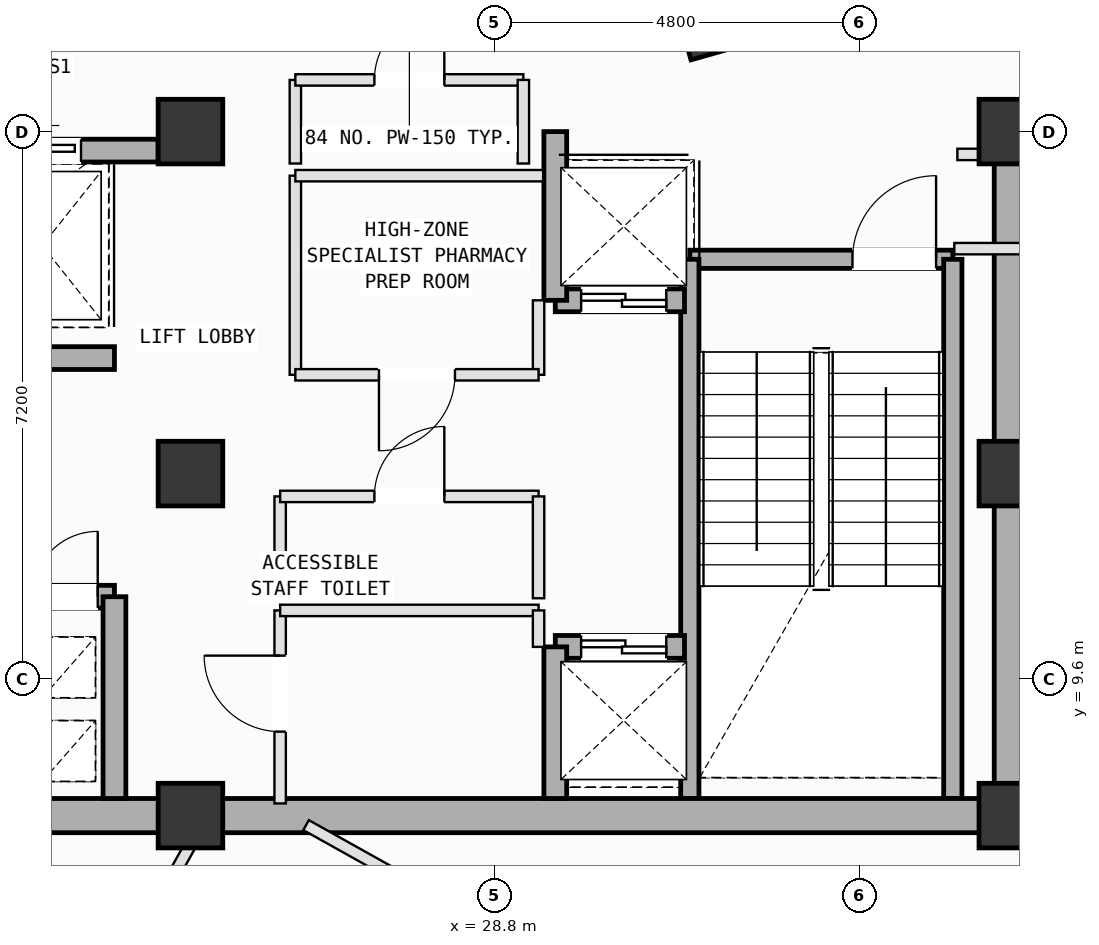
"""IFC4 building model, lengths in metres.
Left out: names, types, materials, properties, quantities, classifications, styles, units other than length and angle.
Written with IfcOpenShell. Run it as: python <this file> out.ifc"""

import sys

from ifc_helpers import new_model, si_unit, direction, frame, frame_2d, origin, origin_2d, place, context, subcontext, project, spatial, rectangle, extrude, element, fill, save


model = new_model("IFC4")
c1 = context("Model", 3, precision=1e-05, world=origin(), true_north=direction((0.0, 1.0)))
c2 = subcontext(c1, "Body", "Model", "MODEL_VIEW")
j1 = project(units=[si_unit("LENGTHUNIT", "METRE"), si_unit("PLANEANGLEUNIT", "RADIAN")], contexts=[c1])
p1 = place(None, origin())
s1 = spatial("IfcSite", under=j1, at=p1, CompositionType="ELEMENT")
p2 = place(p1, origin())
s2 = spatial("IfcBuilding", under=s1, at=p2, CompositionType="ELEMENT")
p3 = place(p2, frame((0.0, 0.0, 284.6)))
s3 = spatial("IfcBuildingStorey", under=s2, at=p3, CompositionType="ELEMENT", Elevation=284.6)
for number, where, z_axis, x_axis in (
    (1, (24.8, 7.8, 0.0), (0.0, 0.0, 1.0), (1.0, 0.0, 0.0)),
    (2, (24.8, 12.3, 0.0), (0.0, 0.0, 1.0), (1.0, 0.0, 0.0)),
    (3, (24.8, 16.8, 0.0), (0.0, 0.0, 1.0), (1.0, 0.0, 0.0)),
    (4, (35.6, 7.8, 0.0), (0.0, 0.0, 1.0), (1.0, 0.0, 0.0)),
    (5, (35.6, 12.3, 0.0), (0.0, 0.0, 1.0), (1.0, 0.0, 0.0)),
    (6, (35.6, 16.8, 0.0), (0.0, 0.0, 1.0), (1.0, 0.0, 0.0)),
):
    element("IfcColumn", number, at=place(p3, frame(where, z_axis=z_axis, x_axis=x_axis)), inside=s3, PredefinedType="COLUMN", context=c2, shape_type="SweptSolid", body=[
        extrude(rectangle(XDim=0.85, YDim=0.85, at=origin_2d()), origin(), (0.0, 0.0, 1.0), 4.0),
    ])
p4 = place(p3, frame((31.37, 15.12, 0.0), z_axis=(0.0, 0.0, 1.0), x_axis=(1.0, 0.0, 0.0)))
e7 = element("IfcWall", 7, at=p4, inside=s3, PredefinedType="SOLIDWALL", context=c2, shape_type="SweptSolid", body=[
    extrude(rectangle(XDim=3.46, YDim=0.24, at=frame_2d((1.73, 0.0))), origin(), (0.0, 0.0, 1.0), 3.78),
])
p5 = place(p4, frame((2.14, 0.0, 0.0)))
e8 = element("IfcOpeningElement", 8, at=p5, cuts=e7, PredefinedType="OPENING", context=c2, shape_type="SweptSolid", body=[
    extrude(rectangle(XDim=1.1, YDim=2.15, at=frame_2d((0.55, 1.075))), frame((0.0, 0.13, 0.0), z_axis=(0.0, -1.0, 0.0), x_axis=(1.0, 0.0, 0.0)), (0.0, 0.0, 1.0), 0.26),
])
for number, where, z_axis, x_axis in (
    (9, (34.83, 15.12, 0.0), (0.0, 0.0, 1.0), (0.0, -1.0, 0.0)),
    (10, (31.37, 8.025, 0.0), (0.0, 0.0, 1.0), (0.0, 1.0, 0.0)),
):
    element("IfcWall", number, at=place(p3, frame(where, z_axis=z_axis, x_axis=x_axis)), inside=s3, PredefinedType="SOLIDWALL", context=c2, shape_type="SweptSolid", body=[
        extrude(rectangle(XDim=7.095, YDim=0.24, at=frame_2d((3.548, 0.0))), origin(), (0.0, 0.0, 1.0), 3.78),
    ])
for number, where, z_axis, x_axis in (
    (11, (14.0, 7.8, 0.0), (0.0, 0.0, 1.0), (1.0, 0.0, 0.0)),
    (12, (24.8, 7.8, 0.0), (0.0, 0.0, 1.0), (1.0, 0.0, 0.0)),
):
    element("IfcWall", number, at=place(p3, frame(where, z_axis=z_axis, x_axis=x_axis)), inside=s3, PredefinedType="SHEAR", context=c2, shape_type="SweptSolid", body=[
        extrude(rectangle(XDim=10.8, YDim=0.45, at=frame_2d((5.4, 0.0))), origin(), (0.0, 0.0, 1.0), 3.78),
    ])
p6 = place(p3, frame((35.6, 7.8, 0.0), z_axis=(0.0, 0.0, 1.0), x_axis=(0.0, 1.0, 0.0)))
e13 = element("IfcWall", 13, at=p6, inside=s3, PredefinedType="SHEAR", context=c2, shape_type="SweptSolid", body=[
    extrude(rectangle(XDim=9.0, YDim=0.45, at=frame_2d((4.5, 0.0))), origin(), (0.0, 0.0, 1.0), 3.78),
])
p7 = place(p3, frame((19.85, 16.55, 0.0), z_axis=(0.0, 0.0, 1.0), x_axis=(1.0, 0.0, 0.0)))
e14 = element("IfcWall", 14, at=p7, inside=s3, PredefinedType="SOLIDWALL", context=c2, shape_type="SweptSolid", body=[
    extrude(rectangle(XDim=4.525, YDim=0.3, at=frame_2d((2.262, 0.0))), origin(), (0.0, 0.0, 1.0), 3.78),
])
p8 = place(p7, frame((0.475, 0.0, 0.0)))
e15 = element("IfcOpeningElement", 15, at=p8, cuts=e14, PredefinedType="OPENING", context=c2, shape_type="SweptSolid", body=[
    extrude(rectangle(XDim=1.25, YDim=2.18, at=frame_2d((0.625, 1.09))), frame((0.0, 0.16, 0.0), z_axis=(0.0, -1.0, 0.0), x_axis=(1.0, 0.0, 0.0)), (0.0, 0.0, 1.0), 0.32),
])
p9 = place(p7, frame((2.49, 0.0, 0.0)))
e16 = element("IfcOpeningElement", 16, at=p9, cuts=e14, PredefinedType="OPENING", context=c2, shape_type="SweptSolid", body=[
    extrude(rectangle(XDim=1.02, YDim=2.12, at=frame_2d((0.51, 1.06))), frame((0.0, 0.16, 0.0), z_axis=(0.0, -1.0, 0.0), x_axis=(1.0, 0.0, 0.0)), (0.0, 0.0, 1.0), 0.32),
])
p10 = place(p3, frame((18.5, 10.68, 0.0), z_axis=(0.0, 0.0, 1.0), x_axis=(1.0, 0.0, 0.0)))
e17 = element("IfcWall", 17, at=p10, inside=s3, PredefinedType="SOLIDWALL", context=c2, shape_type="SweptSolid", body=[
    extrude(rectangle(XDim=5.3, YDim=0.3, at=frame_2d((2.65, 0.0))), origin(), (0.0, 0.0, 1.0), 3.78),
])
p11 = place(p10, frame((4.22, 0.0, 0.0)))
e18 = element("IfcOpeningElement", 18, at=p11, cuts=e17, PredefinedType="OPENING", context=c2, shape_type="SweptSolid", body=[
    extrude(rectangle(XDim=0.86, YDim=2.06, at=frame_2d((0.43, 1.03))), frame((0.0, 0.16, 0.0), z_axis=(0.0, -1.0, 0.0), x_axis=(1.0, 0.0, 0.0)), (0.0, 0.0, 1.0), 0.32),
])
p12 = place(p10, frame((0.425, 0.0, 0.0)))
e19 = element("IfcOpeningElement", 19, at=p12, cuts=e17, PredefinedType="OPENING", context=c2, shape_type="SweptSolid", body=[
    extrude(rectangle(XDim=1.25, YDim=2.18, at=frame_2d((0.625, 1.09))), frame((0.0, 0.16, 0.0), z_axis=(0.0, -1.0, 0.0), x_axis=(1.0, 0.0, 0.0)), (0.0, 0.0, 1.0), 0.32),
])
p13 = place(p10, frame((2.525, 0.0, 0.0)))
e20 = element("IfcOpeningElement", 20, at=p13, cuts=e17, PredefinedType="OPENING", context=c2, shape_type="SweptSolid", body=[
    extrude(rectangle(XDim=1.25, YDim=2.18, at=frame_2d((0.625, 1.09))), frame((0.0, 0.16, 0.0), z_axis=(0.0, -1.0, 0.0), x_axis=(1.0, 0.0, 0.0)), (0.0, 0.0, 1.0), 0.32),
])
p14 = place(p3, frame((18.5, 13.82, 0.0), z_axis=(0.0, 0.0, 1.0), x_axis=(1.0, 0.0, 0.0)))
e21 = element("IfcWall", 21, at=p14, inside=s3, PredefinedType="SOLIDWALL", context=c2, shape_type="SweptSolid", body=[
    extrude(rectangle(XDim=5.3, YDim=0.3, at=frame_2d((2.65, 0.0))), origin(), (0.0, 0.0, 1.0), 3.78),
])
p15 = place(p14, frame((0.18, 0.0, 0.0)))
e22 = element("IfcOpeningElement", 22, at=p15, cuts=e21, PredefinedType="OPENING", context=c2, shape_type="SweptSolid", body=[
    extrude(rectangle(XDim=1.1, YDim=2.15, at=frame_2d((0.55, 1.075))), frame((0.0, 0.16, 0.0), z_axis=(0.0, -1.0, 0.0), x_axis=(1.0, 0.0, 0.0)), (0.0, 0.0, 1.0), 0.32),
])
p16 = place(p3, frame((23.8, 8.025, 0.0), z_axis=(0.0, 0.0, 1.0), x_axis=(0.0, 1.0, 0.0)))
e23 = element("IfcWall", 23, at=p16, inside=s3, PredefinedType="SOLIDWALL", context=c2, shape_type="SweptSolid", body=[
    extrude(rectangle(XDim=2.655, YDim=0.3, at=frame_2d((1.328, 0.0))), origin(), (0.0, 0.0, 1.0), 3.78),
])
p17 = place(p3, frame((29.6, 10.02, 0.0), z_axis=(0.0, 0.0, 1.0), x_axis=(1.0, 0.0, 0.0)))
e24 = element("IfcWall", 24, at=p17, inside=s3, PredefinedType="SOLIDWALL", context=c2, shape_type="SweptSolid", body=[
    extrude(rectangle(XDim=1.7, YDim=0.3, at=frame_2d((0.85, 0.0))), origin(), (0.0, 0.0, 1.0), 3.78),
])
p18 = place(p17, frame((0.34, 0.0, 0.0)))
e25 = element("IfcOpeningElement", 25, at=p18, cuts=e24, PredefinedType="OPENING", context=c2, shape_type="SweptSolid", body=[
    extrude(rectangle(XDim=1.12, YDim=2.15, at=frame_2d((0.56, 1.075))), frame((0.0, 0.16, 0.0), z_axis=(0.0, -1.0, 0.0), x_axis=(1.0, 0.0, 0.0)), (0.0, 0.0, 1.0), 0.32),
])
p19 = place(p3, frame((29.6, 8.025, 0.0), z_axis=(0.0, 0.0, 1.0), x_axis=(0.0, 1.0, 0.0)))
e26 = element("IfcWall", 26, at=p19, inside=s3, PredefinedType="SOLIDWALL", context=c2, shape_type="SweptSolid", body=[
    extrude(rectangle(XDim=1.995, YDim=0.3, at=frame_2d((0.998, 0.0))), origin(), (0.0, 0.0, 1.0), 3.78),
])
p20 = place(p3, frame((29.6, 14.58, 0.0), z_axis=(0.0, 0.0, 1.0), x_axis=(1.0, 0.0, 0.0)))
e27 = element("IfcWall", 27, at=p20, inside=s3, PredefinedType="SOLIDWALL", context=c2, shape_type="SweptSolid", body=[
    extrude(rectangle(XDim=1.7, YDim=0.3, at=frame_2d((0.85, 0.0))), origin(), (0.0, 0.0, 1.0), 3.78),
])
p21 = place(p20, frame((0.34, 0.0, 0.0)))
e28 = element("IfcOpeningElement", 28, at=p21, cuts=e27, PredefinedType="OPENING", context=c2, shape_type="SweptSolid", body=[
    extrude(rectangle(XDim=1.12, YDim=2.15, at=frame_2d((0.56, 1.075))), frame((0.0, 0.16, 0.0), z_axis=(0.0, -1.0, 0.0), x_axis=(1.0, 0.0, 0.0)), (0.0, 0.0, 1.0), 0.32),
])
p22 = place(p3, frame((29.6, 14.58, 0.0), z_axis=(0.0, 0.0, 1.0), x_axis=(0.0, 1.0, 0.0)))
e29 = element("IfcWall", 29, at=p22, inside=s3, PredefinedType="SOLIDWALL", context=c2, shape_type="SweptSolid", body=[
    extrude(rectangle(XDim=2.22, YDim=0.3, at=frame_2d((1.11, 0.0))), origin(), (0.0, 0.0, 1.0), 3.78),
])
p23 = place(p3, frame((25.98, 7.96, 0.0), z_axis=(0.0, 0.0, 1.0), x_axis=(0.0, 1.0, 0.0)))
e30 = element("IfcWall", 30, at=p23, inside=s3, PredefinedType="PARTITIONING", context=c2, shape_type="SweptSolid", body=[
    extrude(rectangle(XDim=2.54, YDim=0.15, at=frame_2d((1.27, 0.0))), origin(), (0.0, 0.0, 1.0), 3.78),
])
p24 = place(p23, frame((0.945, 0.0, 0.0)))
e31 = element("IfcOpeningElement", 31, at=p24, cuts=e30, PredefinedType="OPENING", context=c2, shape_type="SweptSolid", body=[
    extrude(rectangle(XDim=1.0, YDim=2.12, at=frame_2d((0.5, 1.06))), frame((0.0, 0.085, 0.0), z_axis=(0.0, -1.0, 0.0), x_axis=(1.0, 0.0, 0.0)), (0.0, 0.0, 1.0), 0.17),
])
p25 = place(p3, frame((25.98, 10.5, 0.0), z_axis=(0.0, 0.0, 1.0), x_axis=(1.0, 0.0, 0.0)))
e32 = element("IfcWall", 32, at=p25, inside=s3, PredefinedType="PARTITIONING", context=c2, shape_type="SweptSolid", body=[
    extrude(rectangle(XDim=3.4, YDim=0.15, at=frame_2d((1.7, 0.0))), origin(), (0.0, 0.0, 1.0), 3.78),
])
p26 = place(p3, frame((29.38, 10.5, 0.0), z_axis=(0.0, 0.0, 1.0), x_axis=(0.0, -1.0, 0.0)))
e33 = element("IfcWall", 33, at=p26, inside=s3, PredefinedType="PARTITIONING", context=c2, shape_type="SweptSolid", body=[
    extrude(rectangle(XDim=0.48, YDim=0.15, at=frame_2d((0.24, 0.0))), origin(), (0.0, 0.0, 1.0), 3.78),
])
p27 = place(p3, frame((25.98, 10.66, 0.0), z_axis=(0.0, 0.0, 1.0), x_axis=(0.0, 1.0, 0.0)))
e34 = element("IfcWall", 34, at=p27, inside=s3, PredefinedType="PARTITIONING", context=c2, shape_type="SweptSolid", body=[
    extrude(rectangle(XDim=1.34, YDim=0.15, at=frame_2d((0.67, 0.0))), origin(), (0.0, 0.0, 1.0), 3.78),
])
p28 = place(p3, frame((25.98, 12.0, 0.0), z_axis=(0.0, 0.0, 1.0), x_axis=(1.0, 0.0, 0.0)))
e35 = element("IfcWall", 35, at=p28, inside=s3, PredefinedType="PARTITIONING", context=c2, shape_type="SweptSolid", body=[
    extrude(rectangle(XDim=3.4, YDim=0.15, at=frame_2d((1.7, 0.0))), origin(), (0.0, 0.0, 1.0), 3.78),
])
p29 = place(p28, frame((1.24, 0.0, 0.0)))
e36 = element("IfcOpeningElement", 36, at=p29, cuts=e35, PredefinedType="OPENING", context=c2, shape_type="SweptSolid", body=[
    extrude(rectangle(XDim=0.92, YDim=2.1, at=frame_2d((0.46, 1.05))), frame((0.0, 0.085, 0.0), z_axis=(0.0, -1.0, 0.0), x_axis=(1.0, 0.0, 0.0)), (0.0, 0.0, 1.0), 0.17),
])
p30 = place(p3, frame((29.38, 12.0, 0.0), z_axis=(0.0, 0.0, 1.0), x_axis=(0.0, -1.0, 0.0)))
e37 = element("IfcWall", 37, at=p30, inside=s3, PredefinedType="PARTITIONING", context=c2, shape_type="SweptSolid", body=[
    extrude(rectangle(XDim=1.34, YDim=0.15, at=frame_2d((0.67, 0.0))), origin(), (0.0, 0.0, 1.0), 3.78),
])
p31 = place(p3, frame((26.18, 13.6, 0.0), z_axis=(0.0, 0.0, 1.0), x_axis=(0.0, 1.0, 0.0)))
e38 = element("IfcWall", 38, at=p31, inside=s3, PredefinedType="PARTITIONING", context=c2, shape_type="SweptSolid", body=[
    extrude(rectangle(XDim=2.62, YDim=0.15, at=frame_2d((1.31, 0.0))), origin(), (0.0, 0.0, 1.0), 3.78),
])
p32 = place(p3, frame((26.18, 16.22, 0.0), z_axis=(0.0, 0.0, 1.0), x_axis=(1.0, 0.0, 0.0)))
e39 = element("IfcWall", 39, at=p32, inside=s3, PredefinedType="PARTITIONING", context=c2, shape_type="SweptSolid", body=[
    extrude(rectangle(XDim=3.26, YDim=0.15, at=frame_2d((1.63, 0.0))), origin(), (0.0, 0.0, 1.0), 3.78),
])
p33 = place(p3, frame((29.38, 14.58, 0.0), z_axis=(0.0, 0.0, 1.0), x_axis=(0.0, -1.0, 0.0)))
e40 = element("IfcWall", 40, at=p33, inside=s3, PredefinedType="PARTITIONING", context=c2, shape_type="SweptSolid", body=[
    extrude(rectangle(XDim=0.98, YDim=0.15, at=frame_2d((0.49, 0.0))), origin(), (0.0, 0.0, 1.0), 3.78),
])
p34 = place(p3, frame((29.38, 13.6, 0.0), z_axis=(0.0, 0.0, 1.0), x_axis=(-1.0, 0.0, 0.0)))
e41 = element("IfcWall", 41, at=p34, inside=s3, PredefinedType="PARTITIONING", context=c2, shape_type="SweptSolid", body=[
    extrude(rectangle(XDim=3.2, YDim=0.15, at=frame_2d((1.6, 0.0))), origin(), (0.0, 0.0, 1.0), 3.78),
])
p35 = place(p34, frame((1.1, 0.0, 0.0)))
e42 = element("IfcOpeningElement", 42, at=p35, cuts=e41, PredefinedType="OPENING", context=c2, shape_type="SweptSolid", body=[
    extrude(rectangle(XDim=1.0, YDim=2.12, at=frame_2d((0.5, 1.06))), frame((0.0, 0.085, 0.0), z_axis=(0.0, -1.0, 0.0), x_axis=(1.0, 0.0, 0.0)), (0.0, 0.0, 1.0), 0.17),
])
p36 = place(p3, frame((26.18, 16.38, 0.0), z_axis=(0.0, 0.0, 1.0), x_axis=(0.0, 1.0, 0.0)))
e43 = element("IfcWall", 43, at=p36, inside=s3, PredefinedType="PARTITIONING", context=c2, shape_type="SweptSolid", body=[
    extrude(rectangle(XDim=1.1, YDim=0.15, at=frame_2d((0.55, 0.0))), origin(), (0.0, 0.0, 1.0), 3.78),
])
p37 = place(p3, frame((26.18, 17.48, 0.0), z_axis=(0.0, 0.0, 1.0), x_axis=(1.0, 0.0, 0.0)))
e44 = element("IfcWall", 44, at=p37, inside=s3, PredefinedType="PARTITIONING", context=c2, shape_type="SweptSolid", body=[
    extrude(rectangle(XDim=3.0, YDim=0.15, at=frame_2d((1.5, 0.0))), origin(), (0.0, 0.0, 1.0), 3.78),
])
p38 = place(p37, frame((1.04, 0.0, 0.0)))
e45 = element("IfcOpeningElement", 45, at=p38, cuts=e44, PredefinedType="OPENING", context=c2, shape_type="SweptSolid", body=[
    extrude(rectangle(XDim=0.92, YDim=2.1, at=frame_2d((0.46, 1.05))), frame((0.0, 0.085, 0.0), z_axis=(0.0, -1.0, 0.0), x_axis=(1.0, 0.0, 0.0)), (0.0, 0.0, 1.0), 0.17),
])
p39 = place(p3, frame((29.18, 17.48, 0.0), z_axis=(0.0, 0.0, 1.0), x_axis=(0.0, -1.0, 0.0)))
e46 = element("IfcWall", 46, at=p39, inside=s3, PredefinedType="PARTITIONING", context=c2, shape_type="SweptSolid", body=[
    extrude(rectangle(XDim=1.1, YDim=0.15, at=frame_2d((0.55, 0.0))), origin(), (0.0, 0.0, 1.0), 3.78),
])
p40 = place(p3, frame((34.585, 3.4, 0.0), z_axis=(0.0, 0.0, 1.0), x_axis=(0.487887642735, 0.872906437178, 0.0)))
e47 = element("IfcWall", 47, at=p40, inside=s3, PredefinedType="PARTITIONING", context=c2, shape_type="SweptSolid", body=[
    extrude(rectangle(XDim=4.54, YDim=0.15, at=frame_2d((2.27, 0.0))), origin(), (0.0, 0.0, 1.0), 3.78),
])
p41 = place(p3, frame((20.963, 0.548, 0.0), z_axis=(0.0, 0.0, 1.0), x_axis=(0.48783303812, 0.872936954721, 0.0)))
e48 = element("IfcWall", 48, at=p41, inside=s3, PredefinedType="PARTITIONING", context=c2, shape_type="SweptSolid", body=[
    extrude(rectangle(XDim=7.964, YDim=0.15, at=frame_2d((3.982, 0.0))), origin(), (0.0, 0.0, 1.0), 3.78),
])
p42 = place(p3, frame((26.321, 7.675, 0.0), z_axis=(0.0, 0.0, 1.0), x_axis=(0.87290046745, -0.487898323348, 0.0)))
e49 = element("IfcWall", 49, at=p42, inside=s3, PredefinedType="PARTITIONING", context=c2, shape_type="SweptSolid", body=[
    extrude(rectangle(XDim=3.839, YDim=0.15, at=frame_2d((1.919, 0.0))), origin(), (0.0, 0.0, 1.0), 3.78),
])
p43 = place(p3, frame((34.89, 16.5, 0.0), z_axis=(0.0, 0.0, 1.0), x_axis=(1.0, 0.0, 0.0)))
e50 = element("IfcWall", 50, at=p43, inside=s3, PredefinedType="PARTITIONING", context=c2, shape_type="SweptSolid", body=[
    extrude(rectangle(XDim=1.61, YDim=0.15, at=frame_2d((0.805, 0.0))), origin(), (0.0, 0.0, 1.0), 3.165),
])
p44 = place(p3, frame((36.15, 15.26, 0.0), z_axis=(0.0, 0.0, 1.0), x_axis=(-1.0, 0.0, 0.0)))
e51 = element("IfcWall", 51, at=p44, inside=s3, PredefinedType="PARTITIONING", context=c2, shape_type="SweptSolid", body=[
    extrude(rectangle(XDim=1.3, YDim=0.15, at=frame_2d((0.65, 0.0))), origin(), (0.0, 0.0, 1.0), 3.78),
])
p45 = place(p5, origin())
e52 = element("IfcDoor", 52, at=p45, inside=s3, OperationType="SINGLE_SWING_RIGHT", PredefinedType="DOOR", context=c2, shape_type="SweptSolid", body=[
    extrude(rectangle(XDim=1.1, YDim=2.15, at=frame_2d((0.55, 1.075))), frame((0.0, 0.025, 0.0), z_axis=(0.0, -1.0, 0.0), x_axis=(1.0, 0.0, 0.0)), (0.0, 0.0, 1.0), 0.05),
])
fill(e8, e52)
p46 = place(p11, origin())
e53 = element("IfcDoor", 53, at=p46, inside=s3, OperationType="SINGLE_SWING_RIGHT", PredefinedType="DOOR", context=c2, shape_type="SweptSolid", body=[
    extrude(rectangle(XDim=0.86, YDim=2.06, at=frame_2d((0.43, 1.03))), frame((0.0, 0.025, 0.0), z_axis=(0.0, -1.0, 0.0), x_axis=(1.0, 0.0, 0.0)), (0.0, 0.0, 1.0), 0.05),
])
fill(e18, e53)
p47 = place(p18, origin())
e54 = element("IfcDoor", 54, at=p47, inside=s3, OperationType="DOUBLE_DOOR_SLIDING", PredefinedType="DOOR", context=c2, shape_type="SweptSolid", body=[
    extrude(rectangle(XDim=1.12, YDim=2.15, at=frame_2d((0.56, 1.075))), frame((0.0, 0.025, 0.0), z_axis=(0.0, -1.0, 0.0), x_axis=(1.0, 0.0, 0.0)), (0.0, 0.0, 1.0), 0.05),
])
fill(e25, e54)
p48 = place(p21, origin())
e55 = element("IfcDoor", 55, at=p48, inside=s3, OperationType="DOUBLE_DOOR_SLIDING", PredefinedType="DOOR", context=c2, shape_type="SweptSolid", body=[
    extrude(rectangle(XDim=1.12, YDim=2.15, at=frame_2d((0.56, 1.075))), frame((0.0, 0.025, 0.0), z_axis=(0.0, -1.0, 0.0), x_axis=(1.0, 0.0, 0.0)), (0.0, 0.0, 1.0), 0.05),
])
fill(e28, e55)
p49 = place(p9, origin())
e56 = element("IfcDoor", 56, at=p49, inside=s3, OperationType="SLIDING_TO_LEFT", PredefinedType="DOOR", context=c2, shape_type="SweptSolid", body=[
    extrude(rectangle(XDim=1.02, YDim=2.12, at=frame_2d((0.51, 1.06))), frame((0.0, 0.025, 0.0), z_axis=(0.0, -1.0, 0.0), x_axis=(1.0, 0.0, 0.0)), (0.0, 0.0, 1.0), 0.05),
])
fill(e16, e56)
p50 = place(p24, origin())
e57 = element("IfcDoor", 57, at=p50, inside=s3, OperationType="SINGLE_SWING_RIGHT", PredefinedType="DOOR", context=c2, shape_type="SweptSolid", body=[
    extrude(rectangle(XDim=1.0, YDim=2.12, at=frame_2d((0.5, 1.06))), frame((0.0, 0.025, 0.0), z_axis=(0.0, -1.0, 0.0), x_axis=(1.0, 0.0, 0.0)), (0.0, 0.0, 1.0), 0.05),
])
fill(e31, e57)
p51 = place(p29, origin())
e58 = element("IfcDoor", 58, at=p51, inside=s3, OperationType="SINGLE_SWING_RIGHT", PredefinedType="DOOR", context=c2, shape_type="SweptSolid", body=[
    extrude(rectangle(XDim=0.92, YDim=2.1, at=frame_2d((0.46, 1.05))), frame((0.0, 0.025, 0.0), z_axis=(0.0, -1.0, 0.0), x_axis=(1.0, 0.0, 0.0)), (0.0, 0.0, 1.0), 0.05),
])
fill(e36, e58)
p52 = place(p35, origin())
e59 = element("IfcDoor", 59, at=p52, inside=s3, OperationType="SINGLE_SWING_RIGHT", PredefinedType="DOOR", context=c2, shape_type="SweptSolid", body=[
    extrude(rectangle(XDim=1.0, YDim=2.12, at=frame_2d((0.5, 1.06))), frame((0.0, 0.025, 0.0), z_axis=(0.0, -1.0, 0.0), x_axis=(1.0, 0.0, 0.0)), (0.0, 0.0, 1.0), 0.05),
])
fill(e42, e59)
p53 = place(p38, origin())
e60 = element("IfcDoor", 60, at=p53, inside=s3, OperationType="SINGLE_SWING_RIGHT", PredefinedType="DOOR", context=c2, shape_type="SweptSolid", body=[
    extrude(rectangle(XDim=0.92, YDim=2.1, at=frame_2d((0.46, 1.05))), frame((0.0, 0.025, 0.0), z_axis=(0.0, -1.0, 0.0), x_axis=(1.0, 0.0, 0.0)), (0.0, 0.0, 1.0), 0.05),
])
fill(e45, e60)
save(model, sys.argv[1])
